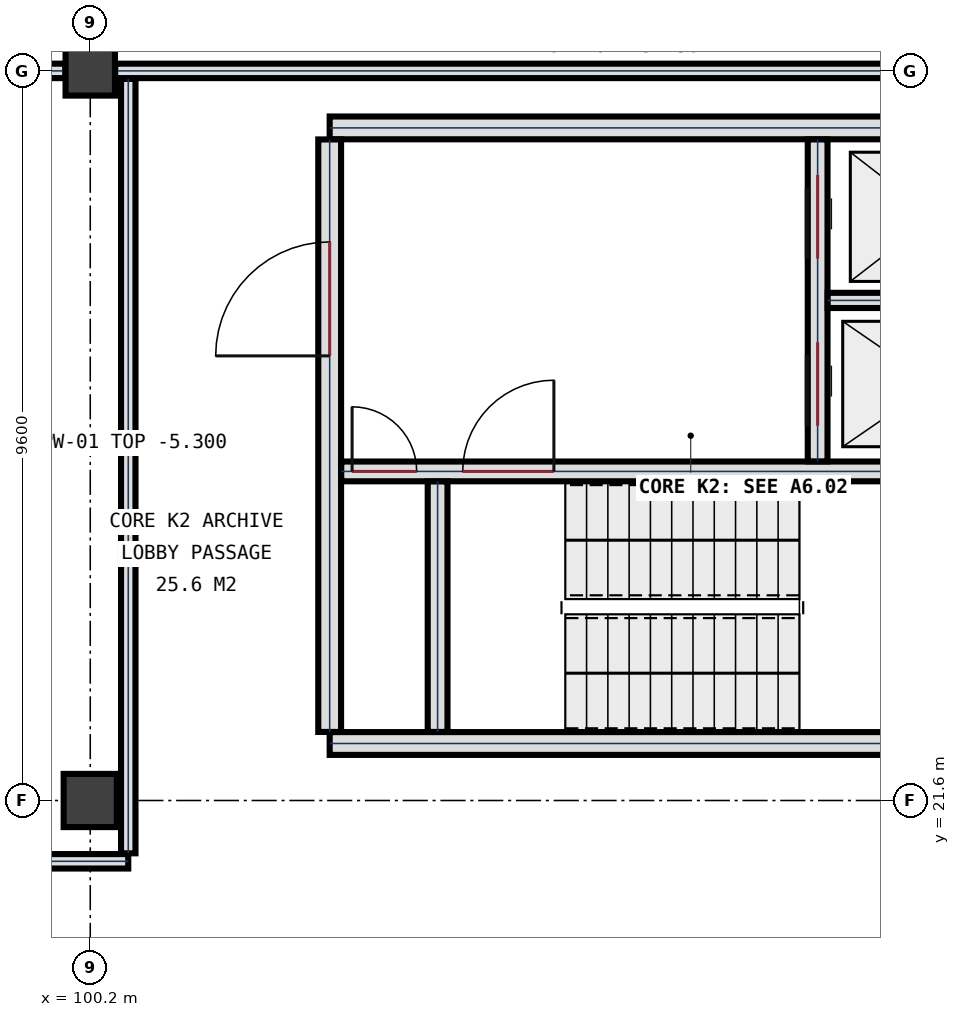
"""IFC4 building model, lengths in metres.
Left out: names, types, materials, properties, quantities, classifications, styles, units other than length and angle.
Written with IfcOpenShell. Run it as: python <this file> out.ifc"""

import sys

from ifc_helpers import new_model, si_unit, direction, frame, frame_2d, origin, origin_2d, place, context, subcontext, project, spatial, rectangle, extrude, element, fill, save


model = new_model("IFC4")
c1 = context("Model", 3, precision=1e-05, world=origin(), true_north=direction((0.0, 1.0)))
c2 = subcontext(c1, "Body", "Model", "MODEL_VIEW")
j1 = project(units=[si_unit("LENGTHUNIT", "METRE"), si_unit("PLANEANGLEUNIT", "RADIAN")], contexts=[c1])
p1 = place(None, origin())
s1 = spatial("IfcSite", under=j1, at=p1, CompositionType="ELEMENT")
p2 = place(p1, origin())
s2 = spatial("IfcBuilding", under=s1, at=p2, CompositionType="ELEMENT")
p3 = place(p2, frame((0.0, 0.0, -8.4)))
s3 = spatial("IfcBuildingStorey", under=s2, at=p3, CompositionType="ELEMENT", Elevation=-8.4)
p4 = place(p3, frame((100.2, 21.6, 0.0), z_axis=(0.0, 0.0, 1.0), x_axis=(1.0, 0.0, 0.0)))
e1 = element("IfcColumn", 1, at=p4, inside=s3, PredefinedType="COLUMN", context=c2, shape_type="SweptSolid", body=[
    extrude(rectangle(XDim=0.7, YDim=0.7, at=origin_2d()), origin(), (0.0, 0.0, 1.0), 4.2),
])
p5 = place(p3, frame((100.2, 31.2, 0.0), z_axis=(0.0, 0.0, 1.0), x_axis=(1.0, 0.0, 0.0)))
e2 = element("IfcColumn", 2, at=p5, inside=s3, PredefinedType="COLUMN", context=c2, shape_type="SweptSolid", body=[
    extrude(rectangle(XDim=0.65, YDim=0.65, at=origin_2d()), origin(), (0.0, 0.0, 1.0), 4.2),
])
for number, where, z_axis, x_axis in (
    (3, (112.85, 22.35, 0.0), (0.0, 0.0, 1.0), (-1.0, 0.0, 0.0)),
    (4, (103.35, 30.45, 0.0), (0.0, 0.0, 1.0), (1.0, 0.0, 0.0)),
):
    element("IfcWall", number, at=place(p3, frame(where, z_axis=z_axis, x_axis=x_axis)), inside=s3, PredefinedType="SHEAR", context=c2, shape_type="SweptSolid", body=[
        extrude(rectangle(XDim=9.5, YDim=0.3, at=frame_2d((4.75, 0.0))), origin(), (0.0, 0.0, 1.0), 4.2),
    ])
p6 = place(p3, frame((103.35, 22.502, 0.0), z_axis=(0.0, 0.0, 1.0), x_axis=(0.0, 1.0, 0.0)))
e5 = element("IfcWall", 5, at=p6, inside=s3, PredefinedType="SHEAR", context=c2, shape_type="SweptSolid", body=[
    extrude(rectangle(XDim=7.796, YDim=0.3, at=frame_2d((3.898, 0.0))), origin(), (0.0, 0.0, 1.0), 4.2),
])
p7 = place(p6, frame((4.948, 0.0, 0.0)))
e6 = element("IfcOpeningElement", 6, at=p7, cuts=e5, PredefinedType="OPENING", context=c2, shape_type="SweptSolid", body=[
    extrude(rectangle(XDim=1.5, YDim=2.25, at=frame_2d((0.75, 1.125))), frame((0.0, 0.16, 0.0), z_axis=(0.0, -1.0, 0.0), x_axis=(1.0, 0.0, 0.0)), (0.0, 0.0, 1.0), 0.32),
])
p8 = place(p3, frame((103.502, 25.93, 0.0), z_axis=(0.0, 0.0, 1.0), x_axis=(1.0, 0.0, 0.0)))
e7 = element("IfcWall", 7, at=p8, inside=s3, PredefinedType="SHEAR", context=c2, shape_type="SweptSolid", body=[
    extrude(rectangle(XDim=9.196, YDim=0.26, at=frame_2d((4.598, 0.0))), origin(), (0.0, 0.0, 1.0), 4.2),
])
p9 = place(p8, frame((1.598, 0.0, 0.0)))
e8 = element("IfcOpeningElement", 8, at=p9, cuts=e7, PredefinedType="OPENING", context=c2, shape_type="SweptSolid", body=[
    extrude(rectangle(XDim=1.2, YDim=2.2, at=frame_2d((0.6, 1.1))), frame((0.0, 0.14, 0.0), z_axis=(0.0, -1.0, 0.0), x_axis=(1.0, 0.0, 0.0)), (0.0, 0.0, 1.0), 0.28),
])
p10 = place(p8, frame((0.143, 0.0, 0.0)))
e9 = element("IfcOpeningElement", 9, at=p10, cuts=e7, PredefinedType="OPENING", context=c2, shape_type="SweptSolid", body=[
    extrude(rectangle(XDim=0.85, YDim=2.05, at=frame_2d((0.425, 1.025))), frame((0.0, 0.14, 0.0), z_axis=(0.0, -1.0, 0.0), x_axis=(1.0, 0.0, 0.0)), (0.0, 0.0, 1.0), 0.28),
])
p11 = place(p3, frame((104.77, 22.502, 0.0), z_axis=(0.0, 0.0, 1.0), x_axis=(0.0, 1.0, 0.0)))
e10 = element("IfcWall", 10, at=p11, inside=s3, PredefinedType="SHEAR", context=c2, shape_type="SweptSolid", body=[
    extrude(rectangle(XDim=3.296, YDim=0.26, at=frame_2d((1.648, 0.0))), origin(), (0.0, 0.0, 1.0), 4.2),
])
p12 = place(p3, frame((109.77, 26.062, 0.0), z_axis=(0.0, 0.0, 1.0), x_axis=(0.0, 1.0, 0.0)))
e11 = element("IfcWall", 11, at=p12, inside=s3, PredefinedType="SHEAR", context=c2, shape_type="SweptSolid", body=[
    extrude(rectangle(XDim=4.236, YDim=0.26, at=frame_2d((2.118, 0.0))), origin(), (0.0, 0.0, 1.0), 4.2),
])
p13 = place(p12, frame((0.468, 0.0, 0.0)))
e12 = element("IfcOpeningElement", 12, at=p13, cuts=e11, PredefinedType="OPENING", context=c2, shape_type="SweptSolid", body=[
    extrude(rectangle(XDim=1.1, YDim=2.15, at=frame_2d((0.55, 1.075))), frame((0.0, 0.14, 0.0), z_axis=(0.0, -1.0, 0.0), x_axis=(1.0, 0.0, 0.0)), (0.0, 0.0, 1.0), 0.28),
])
p14 = place(p12, frame((2.668, 0.0, 0.0)))
e13 = element("IfcOpeningElement", 13, at=p14, cuts=e11, PredefinedType="OPENING", context=c2, shape_type="SweptSolid", body=[
    extrude(rectangle(XDim=1.1, YDim=2.15, at=frame_2d((0.55, 1.075))), frame((0.0, 0.14, 0.0), z_axis=(0.0, -1.0, 0.0), x_axis=(1.0, 0.0, 0.0)), (0.0, 0.0, 1.0), 0.28),
])
p15 = place(p3, frame((109.902, 28.18, 0.0), z_axis=(0.0, 0.0, 1.0), x_axis=(1.0, 0.0, 0.0)))
e14 = element("IfcWall", 14, at=p15, inside=s3, PredefinedType="PLUMBINGWALL", context=c2, shape_type="SweptSolid", body=[
    extrude(rectangle(XDim=2.796, YDim=0.2, at=frame_2d((1.398, 0.0))), origin(), (0.0, 0.0, 1.0), 3.86),
])
p16 = place(p3, frame((59.2, 20.8, 0.0), z_axis=(0.0, 0.0, 1.0), x_axis=(1.0, 0.0, 0.0)))
e15 = element("IfcWall", 15, at=p16, inside=s3, PredefinedType="PARTITIONING", context=c2, shape_type="SweptSolid", body=[
    extrude(rectangle(XDim=41.5, YDim=0.19, at=frame_2d((20.75, 0.0))), origin(), (0.0, 0.0, 1.0), 2.9),
])
p17 = place(p16, frame((20.2, 0.0, 0.0)))
e16 = element("IfcOpeningElement", 16, at=p17, cuts=e15, PredefinedType="OPENING", context=c2, shape_type="SweptSolid", body=[
    extrude(rectangle(XDim=1.2, YDim=2.2, at=frame_2d((0.6, 1.1))), frame((0.0, 0.105, 0.0), z_axis=(0.0, -1.0, 0.0), x_axis=(1.0, 0.0, 0.0)), (0.0, 0.0, 1.0), 0.21),
])
p18 = place(p3, frame((87.203, 31.2, 0.0), z_axis=(0.0, 0.0, 1.0), x_axis=(1.0, 0.0, 0.0)))
e17 = element("IfcWall", 17, at=p18, inside=s3, PredefinedType="PARTITIONING", context=c2, shape_type="SweptSolid", body=[
    extrude(rectangle(XDim=12.669, YDim=0.19, at=frame_2d((6.334, 0.0))), origin(), (0.0, 0.0, 1.0), 2.95),
])
p19 = place(p3, frame((100.528, 31.2, 0.0), z_axis=(0.0, 0.0, 1.0), x_axis=(1.0, 0.0, 0.0)))
e18 = element("IfcWall", 18, at=p19, inside=s3, PredefinedType="PARTITIONING", context=c2, shape_type="SweptSolid", body=[
    extrude(rectangle(XDim=12.769, YDim=0.19, at=frame_2d((6.385, 0.0))), origin(), (0.0, 0.0, 1.0), 2.95),
])
p20 = place(p3, frame((100.7, 20.905, 0.0), z_axis=(0.0, 0.0, 1.0), x_axis=(0.0, 1.0, 0.0)))
e19 = element("IfcWall", 19, at=p20, inside=s3, PredefinedType="PARTITIONING", context=c2, shape_type="SweptSolid", body=[
    extrude(rectangle(XDim=10.19, YDim=0.19, at=frame_2d((5.095, 0.0))), origin(), (0.0, 0.0, 1.0), 3.1),
])
p21 = place(p7, origin())
e20 = element("IfcDoor", 20, at=p21, inside=s3, OperationType="SINGLE_SWING_LEFT", PredefinedType="DOOR", context=c2, shape_type="SweptSolid", body=[
    extrude(rectangle(XDim=1.5, YDim=2.25, at=frame_2d((0.75, 1.125))), frame((0.0, 0.032, 0.0), z_axis=(0.0, -1.0, 0.0), x_axis=(1.0, 0.0, 0.0)), (0.0, 0.0, 1.0), 0.065),
])
fill(e6, e20)
p22 = place(p9, origin())
e21 = element("IfcDoor", 21, at=p22, inside=s3, OperationType="SINGLE_SWING_RIGHT", PredefinedType="DOOR", context=c2, shape_type="SweptSolid", body=[
    extrude(rectangle(XDim=1.2, YDim=2.2, at=frame_2d((0.6, 1.1))), frame((0.0, 0.032, 0.0), z_axis=(0.0, -1.0, 0.0), x_axis=(1.0, 0.0, 0.0)), (0.0, 0.0, 1.0), 0.065),
])
fill(e8, e21)
p23 = place(p10, origin())
e22 = element("IfcDoor", 22, at=p23, inside=s3, OperationType="SINGLE_SWING_LEFT", PredefinedType="DOOR", context=c2, shape_type="SweptSolid", body=[
    extrude(rectangle(XDim=0.85, YDim=2.05, at=frame_2d((0.425, 1.025))), frame((0.0, 0.032, 0.0), z_axis=(0.0, -1.0, 0.0), x_axis=(1.0, 0.0, 0.0)), (0.0, 0.0, 1.0), 0.065),
])
fill(e9, e22)
p24 = place(p13, origin())
e23 = element("IfcDoor", 23, at=p24, inside=s3, OperationType="SLIDING_TO_LEFT", PredefinedType="DOOR", context=c2, shape_type="SweptSolid", body=[
    extrude(rectangle(XDim=1.1, YDim=2.15, at=frame_2d((0.55, 1.075))), frame((0.0, 0.032, 0.0), z_axis=(0.0, -1.0, 0.0), x_axis=(1.0, 0.0, 0.0)), (0.0, 0.0, 1.0), 0.065),
])
fill(e12, e23)
p25 = place(p14, origin())
e24 = element("IfcDoor", 24, at=p25, inside=s3, OperationType="SLIDING_TO_LEFT", PredefinedType="DOOR", context=c2, shape_type="SweptSolid", body=[
    extrude(rectangle(XDim=1.1, YDim=2.15, at=frame_2d((0.55, 1.075))), frame((0.0, 0.032, 0.0), z_axis=(0.0, -1.0, 0.0), x_axis=(1.0, 0.0, 0.0)), (0.0, 0.0, 1.0), 0.065),
])
fill(e13, e24)
save(model, sys.argv[1])
